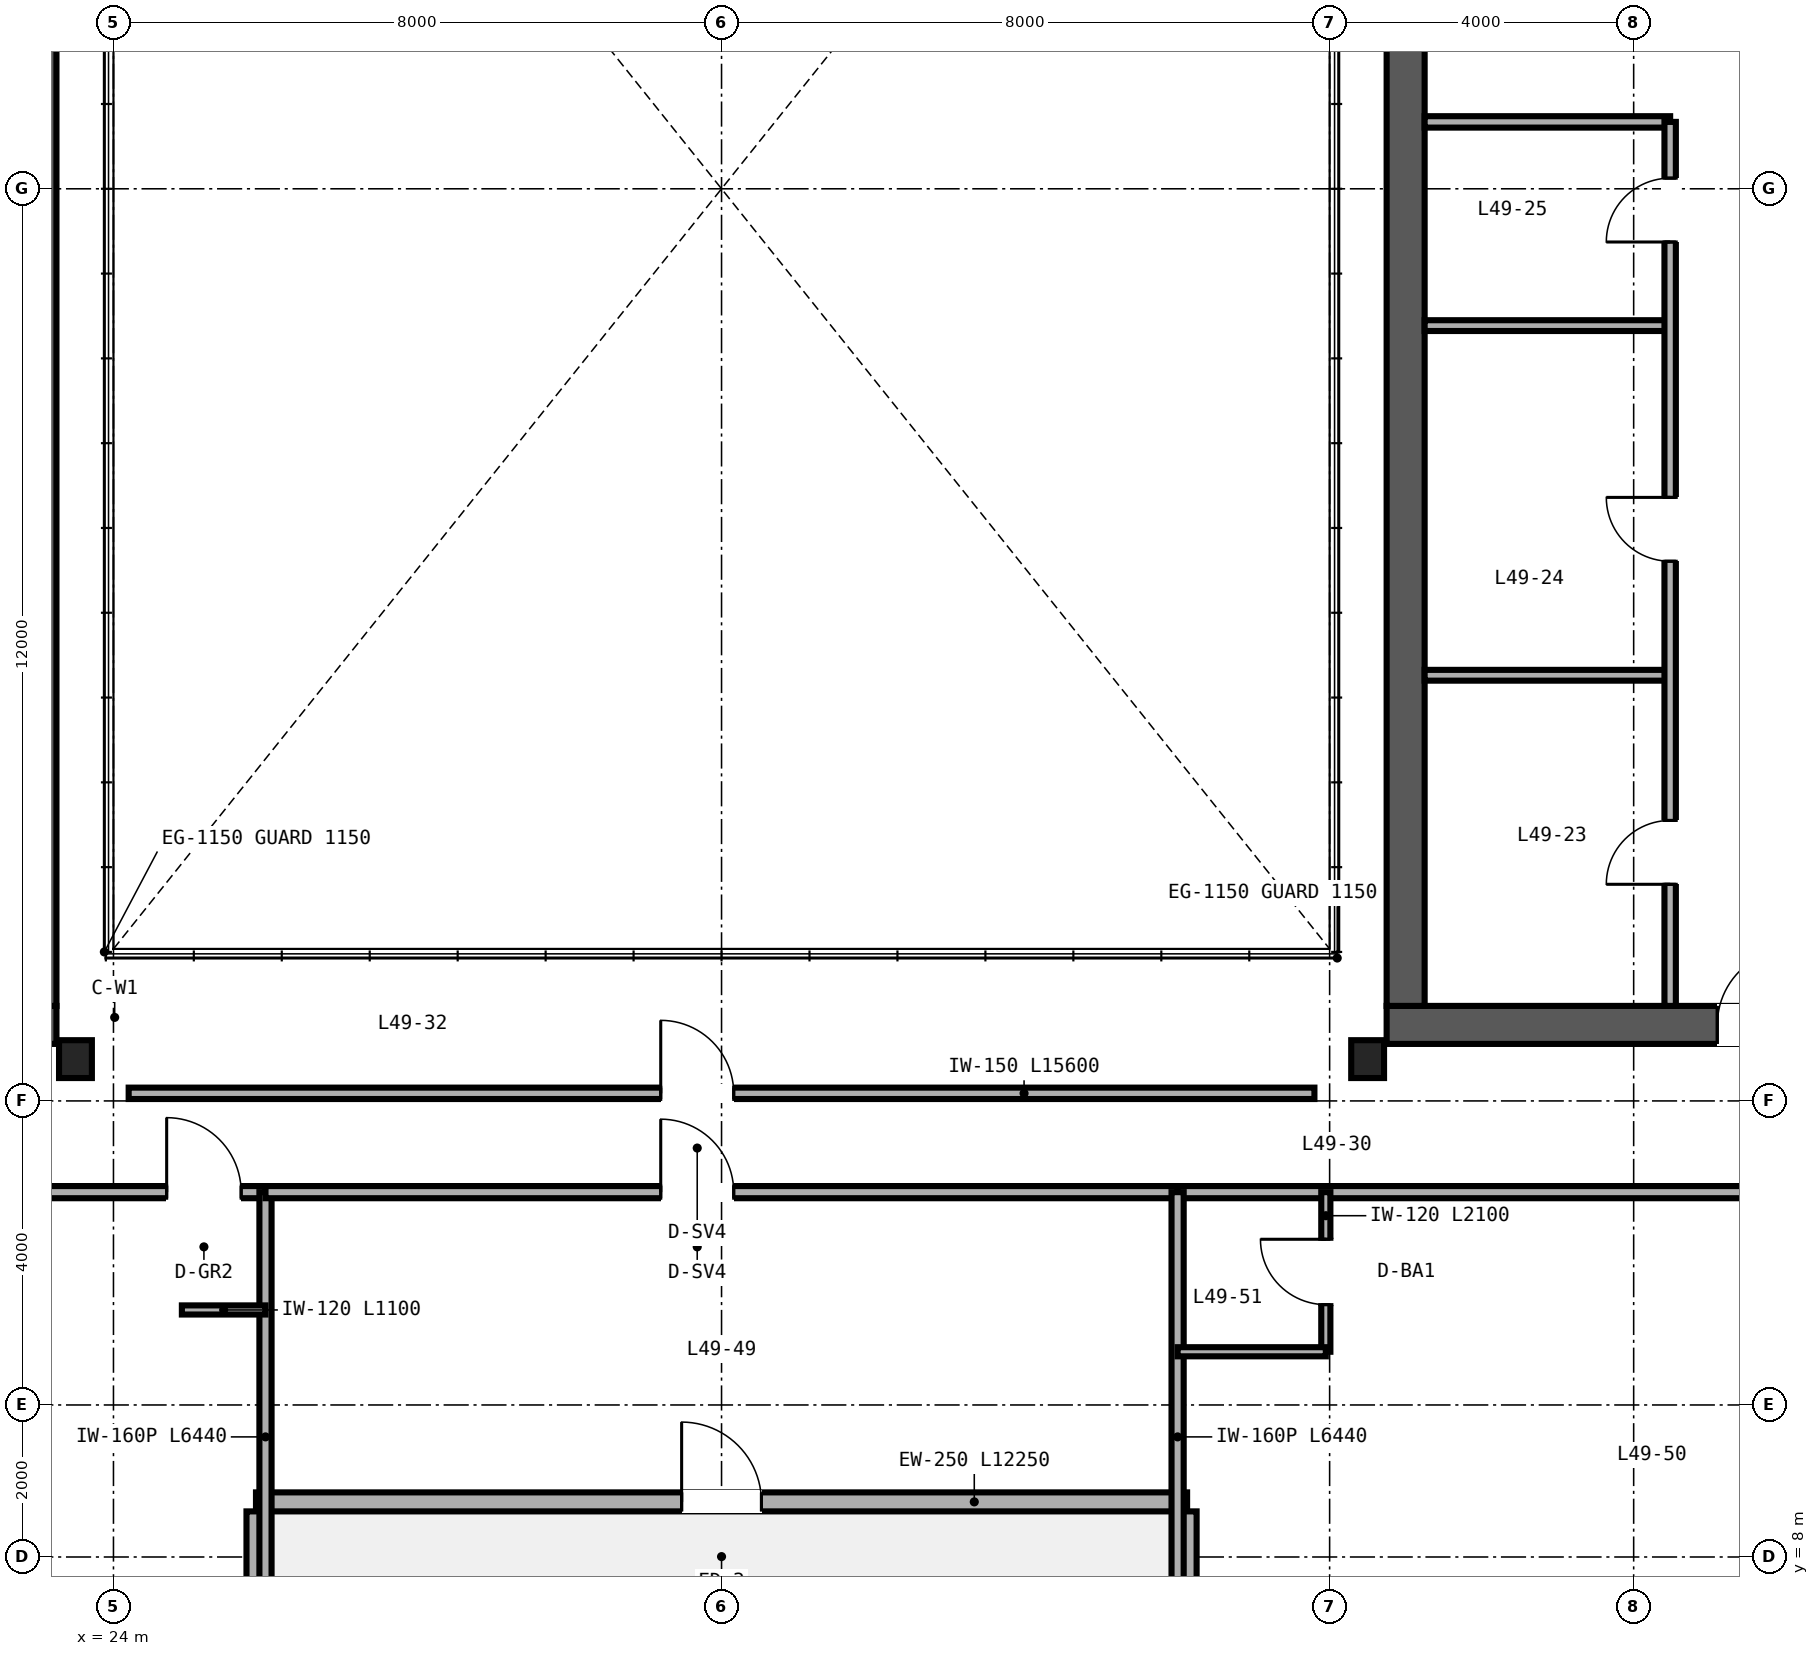
"""IFC4 building model, lengths in metres.
Left out: names, types, materials, properties, quantities, classifications, styles, units other than length and angle.
Written with IfcOpenShell. Run it as: python <this file> out.ifc"""

import sys

from ifc_helpers import new_model, si_unit, direction, frame, frame_2d, origin, origin_2d, place, context, subcontext, project, spatial, rectangle, i_section, extrude, source, transform, mapped, element, fill, save


model = new_model("IFC4")
c1 = context("Model", 3, precision=1e-05, world=origin(), true_north=direction((0.0, 1.0)))
c2 = subcontext(c1, "Body", "Model", "MODEL_VIEW")
j1 = project(units=[si_unit("LENGTHUNIT", "METRE"), si_unit("PLANEANGLEUNIT", "RADIAN")], contexts=[c1])
p1 = place(None, origin())
s1 = spatial("IfcSite", under=j1, at=p1, CompositionType="ELEMENT")
p2 = place(p1, origin())
s2 = spatial("IfcBuilding", under=s1, at=p2, CompositionType="ELEMENT")
p3 = place(p2, frame((0.0, 0.0, 195.6)))
s3 = spatial("IfcBuildingStorey", under=s2, at=p3, CompositionType="ELEMENT", Elevation=195.6)
p4 = place(p3, frame((10.75, 15.0, 0.0), z_axis=(0.0, 0.0, 1.0), x_axis=(1.0, 0.0, 0.0)))
e1 = element("IfcWall", 1, at=p4, inside=s3, PredefinedType="SHEAR", context=c2, shape_type="SweptSolid", body=[
    extrude(rectangle(XDim=12.5, YDim=0.5, at=frame_2d((6.25, 0.0))), origin(), (0.0, 0.0, 1.0), 3.37),
])
p5 = place(p4, frame((10.15, 0.0, 0.0)))
e2 = element("IfcOpeningElement", 2, at=p5, cuts=e1, PredefinedType="OPENING", context=c2, shape_type="SweptSolid", body=[
    extrude(rectangle(XDim=1.0, YDim=2.15, at=frame_2d((0.5, 1.075))), frame((0.0, 0.26, 0.0), z_axis=(0.0, -1.0, 0.0), x_axis=(1.0, 0.0, 0.0)), (0.0, 0.0, 1.0), 0.52),
])
p6 = place(p3, frame((23.0, 15.25, 0.0), z_axis=(0.0, 0.0, 1.0), x_axis=(0.0, 1.0, 0.0)))
e3 = element("IfcWall", 3, at=p6, inside=s3, PredefinedType="SHEAR", context=c2, shape_type="SweptSolid", body=[
    extrude(rectangle(XDim=21.5, YDim=0.5, at=frame_2d((10.75, 0.0))), origin(), (0.0, 0.0, 1.0), 3.37),
])
p7 = place(p3, frame((40.75, 15.0, 0.0), z_axis=(0.0, 0.0, 1.0), x_axis=(1.0, 0.0, 0.0)))
e4 = element("IfcWall", 4, at=p7, inside=s3, PredefinedType="SHEAR", context=c2, shape_type="SweptSolid", body=[
    extrude(rectangle(XDim=12.5, YDim=0.5, at=frame_2d((6.25, 0.0))), origin(), (0.0, 0.0, 1.0), 3.37),
])
p8 = place(p7, frame((4.35, 0.0, 0.0)))
e5 = element("IfcOpeningElement", 5, at=p8, cuts=e4, PredefinedType="OPENING", context=c2, shape_type="SweptSolid", body=[
    extrude(rectangle(XDim=1.0, YDim=2.15, at=frame_2d((0.5, 1.075))), frame((0.0, 0.26, 0.0), z_axis=(0.0, -1.0, 0.0), x_axis=(1.0, 0.0, 0.0)), (0.0, 0.0, 1.0), 0.52),
])
p9 = place(p3, frame((41.0, 15.25, 0.0), z_axis=(0.0, 0.0, 1.0), x_axis=(0.0, 1.0, 0.0)))
e6 = element("IfcWall", 6, at=p9, inside=s3, PredefinedType="SHEAR", context=c2, shape_type="SweptSolid", body=[
    extrude(rectangle(XDim=21.5, YDim=0.5, at=frame_2d((10.75, 0.0))), origin(), (0.0, 0.0, 1.0), 3.37),
])
m1 = source(origin(), c2, "Body", "SweptSolid", [
    extrude(i_section(OverallWidth=0.432, OverallDepth=0.498, WebThickness=0.056, FlangeThickness=0.089, FilletRadius=0.025, at=origin_2d()), origin(), (0.0, 0.0, 1.0), 3.37),
])
for number, where, z_axis, x_axis in (
    (7, (23.5, 14.55, 0.0), (0.0, 0.0, 1.0), (1.0, 0.0, 0.0)),
    (8, (40.5, 14.55, 0.0), (0.0, 0.0, 1.0), (1.0, 0.0, 0.0)),
):
    element("IfcColumn", number, at=place(p3, frame(where, z_axis=z_axis, x_axis=x_axis)), inside=s3, PredefinedType="COLUMN", context=c2, shape_type="MappedRepresentation", body=[
        mapped(m1, transform((0.0, 0.0, 0.0), scale=1.0)),
    ])
p10 = place(p3, frame((25.875, 8.725, 0.0), z_axis=(0.0, 0.0, 1.0), x_axis=(1.0, 0.0, 0.0)))
e9 = element("IfcWall", 9, at=p10, inside=s3, PredefinedType="SOLIDWALL", context=c2, shape_type="SweptSolid", body=[
    extrude(rectangle(XDim=12.25, YDim=0.25, at=frame_2d((6.125, 0.0))), origin(), (0.0, 0.0, 1.0), 3.37),
])
p11 = place(p10, frame((5.6, 0.0, 0.0)))
e10 = element("IfcOpeningElement", 10, at=p11, cuts=e9, PredefinedType="OPENING", context=c2, shape_type="SweptSolid", body=[
    extrude(rectangle(XDim=1.05, YDim=2.15, at=frame_2d((0.525, 1.075))), frame((0.0, 0.135, 0.0), z_axis=(0.0, -1.0, 0.0), x_axis=(1.0, 0.0, 0.0)), (0.0, 0.0, 1.0), 0.27),
])
for number, where, z_axis, x_axis in (
    (11, (25.875, 6.1, 0.0), (0.0, 0.0, 1.0), (0.0, 1.0, 0.0)),
    (12, (38.125, 6.1, 0.0), (0.0, 0.0, 1.0), (0.0, 1.0, 0.0)),
):
    element("IfcWall", number, at=place(p3, frame(where, z_axis=z_axis, x_axis=x_axis)), inside=s3, PredefinedType="SOLIDWALL", context=c2, shape_type="SweptSolid", body=[
        extrude(rectangle(XDim=2.5, YDim=0.25, at=frame_2d((1.25, 0.0))), origin(), (0.0, 0.0, 1.0), 2.443),
    ])
p12 = place(p3, frame((41.25, 26.88, 0.0), z_axis=(0.0, 0.0, 1.0), x_axis=(1.0, 0.0, 0.0)))
e13 = element("IfcWall", 13, at=p12, inside=s3, PredefinedType="PARTITIONING", context=c2, shape_type="SweptSolid", body=[
    extrude(rectangle(XDim=3.23, YDim=0.15, at=frame_2d((1.615, 0.0))), origin(), (0.0, 0.0, 1.0), 3.37),
])
for number, where, z_axis, x_axis in (
    (14, (41.25, 19.6, 0.0), (0.0, 0.0, 1.0), (1.0, 0.0, 0.0)),
    (15, (41.25, 24.2, 0.0), (0.0, 0.0, 1.0), (1.0, 0.0, 0.0)),
):
    element("IfcWall", number, at=place(p3, frame(where, z_axis=z_axis, x_axis=x_axis)), inside=s3, PredefinedType="PARTITIONING", context=c2, shape_type="SweptSolid", body=[
        extrude(rectangle(XDim=3.23, YDim=0.142, at=frame_2d((1.615, 0.0))), origin(), (0.0, 0.0, 1.0), 3.37),
    ])
p13 = place(p3, frame((44.48, 15.25, 0.0), z_axis=(0.0, 0.0, 1.0), x_axis=(0.0, 1.0, 0.0)))
e16 = element("IfcWall", 16, at=p13, inside=s3, PredefinedType="PARTITIONING", context=c2, shape_type="SweptSolid", body=[
    extrude(rectangle(XDim=11.63, YDim=0.15, at=frame_2d((5.815, 0.0))), origin(), (0.0, 0.0, 1.0), 3.37),
])
p14 = place(p13, frame((1.6, 0.0, 0.0)))
e17 = element("IfcOpeningElement", 17, at=p14, cuts=e16, PredefinedType="OPENING", context=c2, shape_type="SweptSolid", body=[
    extrude(rectangle(XDim=0.84, YDim=2.1, at=frame_2d((0.42, 1.05))), frame((0.0, 0.085, 0.0), z_axis=(0.0, -1.0, 0.0), x_axis=(1.0, 0.0, 0.0)), (0.0, 0.0, 1.0), 0.17),
])
p15 = place(p13, frame((5.85, 0.0, 0.0)))
e18 = element("IfcOpeningElement", 18, at=p15, cuts=e16, PredefinedType="OPENING", context=c2, shape_type="SweptSolid", body=[
    extrude(rectangle(XDim=0.84, YDim=2.1, at=frame_2d((0.42, 1.05))), frame((0.0, 0.085, 0.0), z_axis=(0.0, -1.0, 0.0), x_axis=(1.0, 0.0, 0.0)), (0.0, 0.0, 1.0), 0.17),
])
p16 = place(p13, frame((10.05, 0.0, 0.0)))
e19 = element("IfcOpeningElement", 19, at=p16, cuts=e16, PredefinedType="OPENING", context=c2, shape_type="SweptSolid", body=[
    extrude(rectangle(XDim=0.84, YDim=2.1, at=frame_2d((0.42, 1.05))), frame((0.0, 0.085, 0.0), z_axis=(0.0, -1.0, 0.0), x_axis=(1.0, 0.0, 0.0)), (0.0, 0.0, 1.0), 0.17),
])
p17 = place(p3, frame((24.2, 14.1, 0.0), z_axis=(0.0, 0.0, 1.0), x_axis=(1.0, 0.0, 0.0)))
e20 = element("IfcWall", 20, at=p17, inside=s3, PredefinedType="PARTITIONING", context=c2, shape_type="SweptSolid", body=[
    extrude(rectangle(XDim=15.6, YDim=0.15, at=frame_2d((7.8, 0.0))), origin(), (0.0, 0.0, 1.0), 3.37),
])
p18 = place(p17, frame((7.0, 0.0, 0.0)))
e21 = element("IfcOpeningElement", 21, at=p18, cuts=e20, PredefinedType="OPENING", context=c2, shape_type="SweptSolid", body=[
    extrude(rectangle(XDim=0.96, YDim=2.15, at=frame_2d((0.48, 1.075))), frame((0.0, 0.085, 0.0), z_axis=(0.0, -1.0, 0.0), x_axis=(1.0, 0.0, 0.0)), (0.0, 0.0, 1.0), 0.17),
])
p19 = place(p3, frame((14.0, 12.8, 0.0), z_axis=(0.0, 0.0, 1.0), x_axis=(1.0, 0.0, 0.0)))
e22 = element("IfcWall", 22, at=p19, inside=s3, PredefinedType="PARTITIONING", context=c2, shape_type="SweptSolid", body=[
    extrude(rectangle(XDim=12.0, YDim=0.16, at=frame_2d((6.0, 0.0))), origin(), (0.0, 0.0, 1.0), 2.913),
])
p20 = place(p19, frame((10.7, 0.0, 0.0)))
e23 = element("IfcOpeningElement", 23, at=p20, cuts=e22, PredefinedType="OPENING", context=c2, shape_type="SweptSolid", body=[
    extrude(rectangle(XDim=0.98, YDim=2.2, at=frame_2d((0.49, 1.1))), frame((0.0, 0.09, 0.0), z_axis=(0.0, -1.0, 0.0), x_axis=(1.0, 0.0, 0.0)), (0.0, 0.0, 1.0), 0.18),
])
p21 = place(p3, frame((26.0, 6.36, 0.0), z_axis=(0.0, 0.0, 1.0), x_axis=(0.0, 1.0, 0.0)))
e24 = element("IfcWall", 24, at=p21, inside=s3, PredefinedType="PARTITIONING", context=c2, shape_type="SweptSolid", body=[
    extrude(rectangle(XDim=6.44, YDim=0.16, at=frame_2d((3.22, 0.0))), origin(), (0.0, 0.0, 1.0), 2.443),
])
p22 = place(p3, frame((24.9, 11.25, 0.0), z_axis=(0.0, 0.0, 1.0), x_axis=(1.0, 0.0, 0.0)))
e25 = element("IfcWall", 25, at=p22, inside=s3, PredefinedType="PARTITIONING", context=c2, shape_type="SweptSolid", body=[
    extrude(rectangle(XDim=1.1, YDim=0.12, at=frame_2d((0.55, 0.0))), origin(), (0.0, 0.0, 1.0), 3.37),
])
p23 = place(p3, frame((26.0, 12.8, 0.0), z_axis=(0.0, 0.0, 1.0), x_axis=(1.0, 0.0, 0.0)))
e26 = element("IfcWall", 26, at=p23, inside=s3, PredefinedType="PARTITIONING", context=c2, shape_type="SweptSolid", body=[
    extrude(rectangle(XDim=12.0, YDim=0.16, at=frame_2d((6.0, 0.0))), origin(), (0.0, 0.0, 1.0), 3.37),
])
p24 = place(p23, frame((5.2, 0.0, 0.0)))
e27 = element("IfcOpeningElement", 27, at=p24, cuts=e26, PredefinedType="OPENING", context=c2, shape_type="SweptSolid", body=[
    extrude(rectangle(XDim=0.96, YDim=2.15, at=frame_2d((0.48, 1.075))), frame((0.0, 0.09, 0.0), z_axis=(0.0, -1.0, 0.0), x_axis=(1.0, 0.0, 0.0)), (0.0, 0.0, 1.0), 0.18),
])
p25 = place(p3, frame((38.0, 12.8, 0.0), z_axis=(0.0, 0.0, 1.0), x_axis=(1.0, 0.0, 0.0)))
e28 = element("IfcWall", 28, at=p25, inside=s3, PredefinedType="PARTITIONING", context=c2, shape_type="SweptSolid", body=[
    extrude(rectangle(XDim=12.0, YDim=0.16, at=frame_2d((6.0, 0.0))), origin(), (0.0, 0.0, 1.0), 2.913),
])
p26 = place(p25, frame((10.7, 0.0, 0.0)))
e29 = element("IfcOpeningElement", 29, at=p26, cuts=e28, PredefinedType="OPENING", context=c2, shape_type="SweptSolid", body=[
    extrude(rectangle(XDim=0.98, YDim=2.2, at=frame_2d((0.49, 1.1))), frame((0.0, 0.09, 0.0), z_axis=(0.0, -1.0, 0.0), x_axis=(1.0, 0.0, 0.0)), (0.0, 0.0, 1.0), 0.18),
])
p27 = place(p3, frame((38.0, 6.36, 0.0), z_axis=(0.0, 0.0, 1.0), x_axis=(0.0, 1.0, 0.0)))
e30 = element("IfcWall", 30, at=p27, inside=s3, PredefinedType="PARTITIONING", context=c2, shape_type="SweptSolid", body=[
    extrude(rectangle(XDim=6.44, YDim=0.16, at=frame_2d((3.22, 0.0))), origin(), (0.0, 0.0, 1.0), 2.443),
])
p28 = place(p3, frame((39.95, 10.7, 0.0), z_axis=(0.0, 0.0, 1.0), x_axis=(0.0, 1.0, 0.0)))
e31 = element("IfcWall", 31, at=p28, inside=s3, PredefinedType="PARTITIONING", context=c2, shape_type="SweptSolid", body=[
    extrude(rectangle(XDim=2.1, YDim=0.12, at=frame_2d((1.05, 0.0))), origin(), (0.0, 0.0, 1.0), 3.37),
])
p29 = place(p28, frame((0.62, 0.0, 0.0)))
e32 = element("IfcOpeningElement", 32, at=p29, cuts=e31, PredefinedType="OPENING", context=c2, shape_type="SweptSolid", body=[
    extrude(rectangle(XDim=0.86, YDim=2.1, at=frame_2d((0.43, 1.05))), frame((0.0, 0.07, 0.0), z_axis=(0.0, -1.0, 0.0), x_axis=(1.0, 0.0, 0.0)), (0.0, 0.0, 1.0), 0.14),
])
p30 = place(p3, frame((38.0, 10.7, 0.0), z_axis=(0.0, 0.0, 1.0), x_axis=(1.0, 0.0, 0.0)))
e33 = element("IfcWall", 33, at=p30, inside=s3, PredefinedType="PARTITIONING", context=c2, shape_type="SweptSolid", body=[
    extrude(rectangle(XDim=1.95, YDim=0.12, at=frame_2d((0.975, 0.0))), origin(), (0.0, 0.0, 1.0), 3.37),
])
m2 = source(origin(), c2, "Body", "SweptSolid", [
    extrude(rectangle(XDim=1.05, YDim=2.15, at=frame_2d((0.525, 1.075))), frame((0.0, 0.025, 0.0), z_axis=(0.0, -1.0, 0.0), x_axis=(1.0, 0.0, 0.0)), (0.0, 0.0, 1.0), 0.05),
])
p31 = place(p11, origin())
e34 = element("IfcDoor", 34, at=p31, inside=s3, OperationType="SINGLE_SWING_LEFT", PredefinedType="DOOR", context=c2, shape_type="MappedRepresentation", body=[
    mapped(m2, transform((0.0, 0.0, 0.0), scale=1.0)),
])
fill(e10, e34)
m3 = source(origin(), c2, "Body", "SweptSolid", [
    extrude(rectangle(XDim=1.0, YDim=2.15, at=frame_2d((0.5, 1.075))), frame((0.0, 0.025, 0.0), z_axis=(0.0, -1.0, 0.0), x_axis=(1.0, 0.0, 0.0)), (0.0, 0.0, 1.0), 0.05),
])
p32 = place(p8, origin())
e35 = element("IfcDoor", 35, at=p32, inside=s3, OperationType="SINGLE_SWING_RIGHT", PredefinedType="DOOR", context=c2, shape_type="MappedRepresentation", body=[
    mapped(m3, transform((0.0, 0.0, 0.0), scale=1.0)),
])
fill(e5, e35)
m4 = source(origin(), c2, "Body", "SweptSolid", [
    extrude(rectangle(XDim=0.84, YDim=2.1, at=frame_2d((0.42, 1.05))), frame((0.0, 0.025, 0.0), z_axis=(0.0, -1.0, 0.0), x_axis=(1.0, 0.0, 0.0)), (0.0, 0.0, 1.0), 0.05),
])
p33 = place(p14, origin())
e36 = element("IfcDoor", 36, at=p33, inside=s3, OperationType="SINGLE_SWING_LEFT", PredefinedType="DOOR", context=c2, shape_type="MappedRepresentation", body=[
    mapped(m4, transform((0.0, 0.0, 0.0), scale=1.0)),
])
fill(e17, e36)
p34 = place(p15, origin())
e37 = element("IfcDoor", 37, at=p34, inside=s3, OperationType="SINGLE_SWING_RIGHT", PredefinedType="DOOR", context=c2, shape_type="MappedRepresentation", body=[
    mapped(m4, transform((0.0, 0.0, 0.0), scale=1.0)),
])
fill(e18, e37)
p35 = place(p16, origin())
e38 = element("IfcDoor", 38, at=p35, inside=s3, OperationType="SINGLE_SWING_LEFT", PredefinedType="DOOR", context=c2, shape_type="MappedRepresentation", body=[
    mapped(m4, transform((0.0, 0.0, 0.0), scale=1.0)),
])
fill(e19, e38)
m5 = source(origin(), c2, "Body", "SweptSolid", [
    extrude(rectangle(XDim=0.96, YDim=2.15, at=frame_2d((0.48, 1.075))), frame((0.0, 0.025, 0.0), z_axis=(0.0, -1.0, 0.0), x_axis=(1.0, 0.0, 0.0)), (0.0, 0.0, 1.0), 0.05),
])
p36 = place(p18, origin())
e39 = element("IfcDoor", 39, at=p36, inside=s3, OperationType="SINGLE_SWING_LEFT", PredefinedType="DOOR", context=c2, shape_type="MappedRepresentation", body=[
    mapped(m5, transform((0.0, 0.0, 0.0), scale=1.0)),
])
fill(e21, e39)
m6 = source(origin(), c2, "Body", "SweptSolid", [
    extrude(rectangle(XDim=0.98, YDim=2.2, at=frame_2d((0.49, 1.1))), frame((0.0, 0.025, 0.0), z_axis=(0.0, -1.0, 0.0), x_axis=(1.0, 0.0, 0.0)), (0.0, 0.0, 1.0), 0.05),
])
p37 = place(p20, origin())
e40 = element("IfcDoor", 40, at=p37, inside=s3, OperationType="SINGLE_SWING_LEFT", PredefinedType="DOOR", context=c2, shape_type="MappedRepresentation", body=[
    mapped(m6, transform((0.0, 0.0, 0.0), scale=1.0)),
])
fill(e23, e40)
p38 = place(p24, origin())
e41 = element("IfcDoor", 41, at=p38, inside=s3, OperationType="SINGLE_SWING_LEFT", PredefinedType="DOOR", context=c2, shape_type="MappedRepresentation", body=[
    mapped(m5, transform((0.0, 0.0, 0.0), scale=1.0)),
])
fill(e27, e41)
m7 = source(origin(), c2, "Body", "SweptSolid", [
    extrude(rectangle(XDim=0.86, YDim=2.1, at=frame_2d((0.43, 1.05))), frame((0.0, 0.025, 0.0), z_axis=(0.0, -1.0, 0.0), x_axis=(1.0, 0.0, 0.0)), (0.0, 0.0, 1.0), 0.05),
])
p39 = place(p29, origin())
e42 = element("IfcDoor", 42, at=p39, inside=s3, OperationType="SINGLE_SWING_RIGHT", PredefinedType="DOOR", context=c2, shape_type="MappedRepresentation", body=[
    mapped(m7, transform((0.0, 0.0, 0.0), scale=1.0)),
])
fill(e32, e42)
save(model, sys.argv[1])
